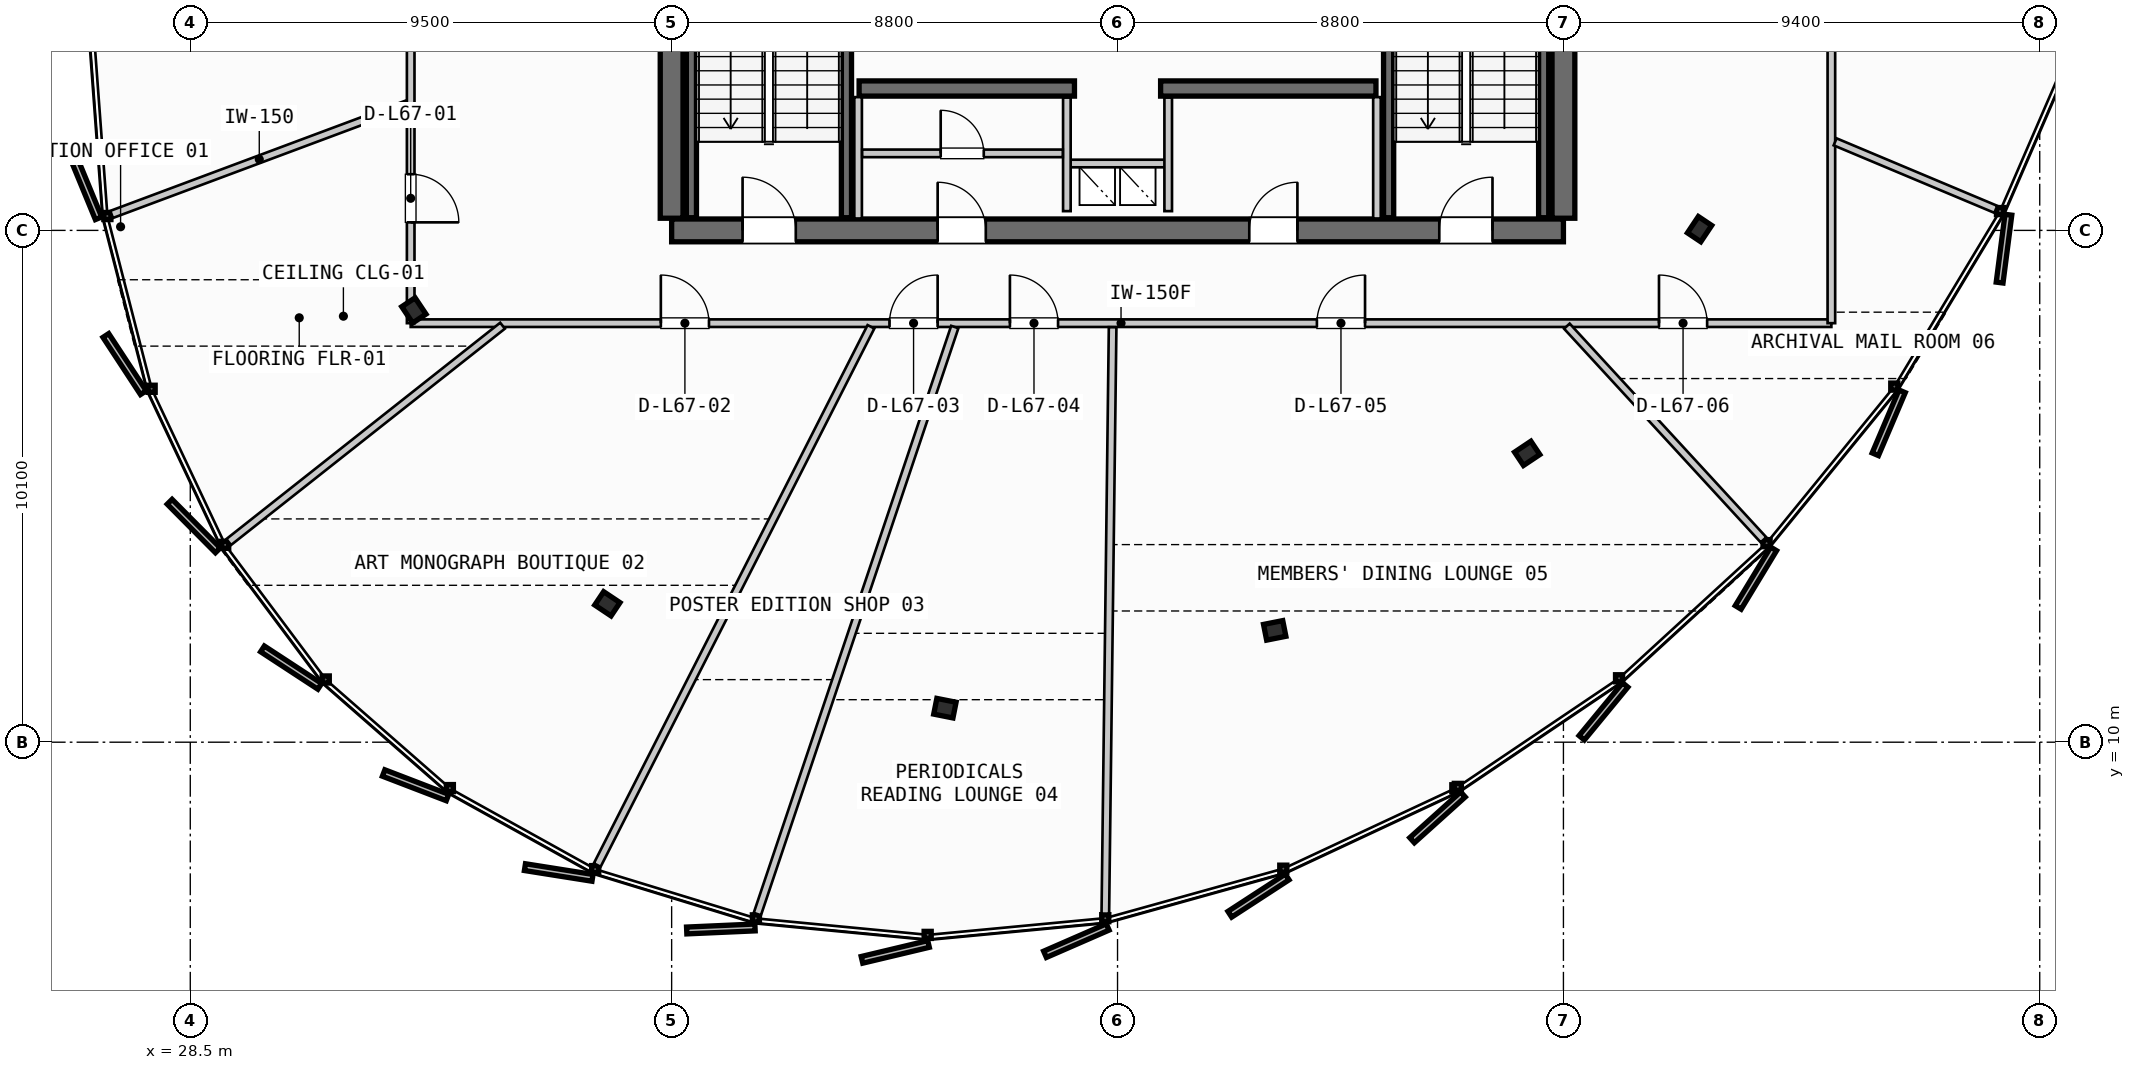
"""IFC4 building model, lengths in metres.
Left out: names, types, materials, properties, quantities, classifications, styles, units other than length and angle.
Written with IfcOpenShell. Run it as: python <this file> out.ifc"""

import sys

from ifc_helpers import new_model, si_unit, direction, frame, frame_2d, origin, origin_2d, place, context, subcontext, project, spatial, rectangle, i_section, extrude, source, transform, mapped, element, fill, save


model = new_model("IFC4")
c1 = context("Model", 3, precision=1e-05, world=origin(), true_north=direction((0.0, 1.0)))
c2 = subcontext(c1, "Body", "Model", "MODEL_VIEW")
j1 = project(units=[si_unit("LENGTHUNIT", "METRE"), si_unit("PLANEANGLEUNIT", "RADIAN")], contexts=[c1])
p1 = place(None, origin())
s1 = spatial("IfcSite", under=j1, at=p1, CompositionType="ELEMENT")
p2 = place(p1, origin())
s2 = spatial("IfcBuilding", under=s1, at=p2, CompositionType="ELEMENT")
p3 = place(p2, frame((0.0, 0.0, 256.0)))
s3 = spatial("IfcBuildingStorey", under=s2, at=p3, CompositionType="ELEMENT", Elevation=256.0)
p4 = place(p3, frame((38.0, 20.1, 0.0), z_axis=(0.0, 0.0, 1.0), x_axis=(1.0, 0.0, 0.0)))
e1 = element("IfcWall", 1, at=p4, inside=s3, PredefinedType="SHEAR", context=c2, shape_type="SweptSolid", body=[
    extrude(rectangle(XDim=17.6, YDim=0.45, at=frame_2d((8.8, 0.0))), origin(), (0.0, 0.0, 1.0), 3.21),
])
p5 = place(p4, frame((1.4, 0.0, 0.0)))
e2 = element("IfcOpeningElement", 2, at=p5, cuts=e1, PredefinedType="OPENING", context=c2, shape_type="SweptSolid", body=[
    extrude(rectangle(XDim=1.05, YDim=2.15, at=frame_2d((0.525, 1.075))), frame((0.0, 0.235, 0.0), z_axis=(0.0, -1.0, 0.0), x_axis=(1.0, 0.0, 0.0)), (0.0, 0.0, 1.0), 0.47),
])
p6 = place(p4, frame((15.15, 0.0, 0.0)))
e3 = element("IfcOpeningElement", 3, at=p6, cuts=e1, PredefinedType="OPENING", context=c2, shape_type="SweptSolid", body=[
    extrude(rectangle(XDim=1.05, YDim=2.15, at=frame_2d((0.525, 1.075))), frame((0.0, 0.235, 0.0), z_axis=(0.0, -1.0, 0.0), x_axis=(1.0, 0.0, 0.0)), (0.0, 0.0, 1.0), 0.47),
])
p7 = place(p4, frame((5.25, 0.0, 0.0)))
e4 = element("IfcOpeningElement", 4, at=p7, cuts=e1, PredefinedType="OPENING", context=c2, shape_type="SweptSolid", body=[
    extrude(rectangle(XDim=0.95, YDim=2.15, at=frame_2d((0.475, 1.075))), frame((0.0, 0.235, 0.0), z_axis=(0.0, -1.0, 0.0), x_axis=(1.0, 0.0, 0.0)), (0.0, 0.0, 1.0), 0.47),
])
p8 = place(p4, frame((11.4, 0.0, 0.0)))
e5 = element("IfcOpeningElement", 5, at=p8, cuts=e1, PredefinedType="OPENING", context=c2, shape_type="SweptSolid", body=[
    extrude(rectangle(XDim=0.95, YDim=2.15, at=frame_2d((0.475, 1.075))), frame((0.0, 0.235, 0.0), z_axis=(0.0, -1.0, 0.0), x_axis=(1.0, 0.0, 0.0)), (0.0, 0.0, 1.0), 0.47),
])
p9 = place(p3, frame((38.0, 35.26, 0.0), z_axis=(0.0, 0.0, 1.0), x_axis=(0.0, -1.0, 0.0)))
e6 = element("IfcWall", 6, at=p9, inside=s3, PredefinedType="SHEAR", context=c2, shape_type="SweptSolid", body=[
    extrude(rectangle(XDim=14.92, YDim=0.45, at=frame_2d((7.46, 0.0))), origin(), (0.0, 0.0, 1.0), 3.21),
])
p10 = place(p9, frame((5.21, 0.0, 0.0)))
e7 = element("IfcOpeningElement", 7, at=p10, cuts=e6, PredefinedType="OPENING", context=c2, shape_type="SweptSolid", body=[
    extrude(rectangle(XDim=1.1, YDim=2.2, at=frame_2d((0.55, 1.1))), frame((0.0, 0.235, 0.0), z_axis=(0.0, -1.0, 0.0), x_axis=(1.0, 0.0, 0.0)), (0.0, 0.0, 1.0), 0.47),
])
p11 = place(p3, frame((55.6, 20.34, 0.0), z_axis=(0.0, 0.0, 1.0), x_axis=(0.0, 1.0, 0.0)))
e8 = element("IfcWall", 8, at=p11, inside=s3, PredefinedType="SHEAR", context=c2, shape_type="SweptSolid", body=[
    extrude(rectangle(XDim=14.92, YDim=0.45, at=frame_2d((7.46, 0.0))), origin(), (0.0, 0.0, 1.0), 3.21),
])
p12 = place(p11, frame((12.71, 0.0, 0.0)))
e9 = element("IfcOpeningElement", 9, at=p12, cuts=e8, PredefinedType="OPENING", context=c2, shape_type="SweptSolid", body=[
    extrude(rectangle(XDim=1.05, YDim=2.15, at=frame_2d((0.525, 1.075))), frame((0.0, 0.235, 0.0), z_axis=(0.0, -1.0, 0.0), x_axis=(1.0, 0.0, 0.0)), (0.0, 0.0, 1.0), 0.47),
])
p13 = place(p11, frame((8.61, 0.0, 0.0)))
e10 = element("IfcOpeningElement", 10, at=p13, cuts=e8, PredefinedType="OPENING", context=c2, shape_type="SweptSolid", body=[
    extrude(rectangle(XDim=1.1, YDim=2.2, at=frame_2d((0.55, 1.1))), frame((0.0, 0.235, 0.0), z_axis=(0.0, -1.0, 0.0), x_axis=(1.0, 0.0, 0.0)), (0.0, 0.0, 1.0), 0.47),
])
for number, where, z_axis, x_axis in (
    (11, (41.7, 22.9, 0.0), (0.0, 0.0, 1.0), (1.0, 0.0, 0.0)),
    (12, (47.65, 22.9, 0.0), (0.0, 0.0, 1.0), (1.0, 0.0, 0.0)),
):
    element("IfcWall", number, at=place(p3, frame(where, z_axis=z_axis, x_axis=x_axis)), inside=s3, PredefinedType="SHEAR", context=c2, shape_type="SweptSolid", body=[
        extrude(rectangle(XDim=4.25, YDim=0.3, at=frame_2d((2.125, 0.0))), origin(), (0.0, 0.0, 1.0), 3.21),
    ])
m1 = source(origin(), c2, "Body", "SweptSolid", [
    extrude(i_section(OverallWidth=0.387, OverallDepth=0.316, WebThickness=0.019, FlangeThickness=0.028, FilletRadius=0.015, at=origin_2d()), origin(), (0.0, 0.0, 1.0), 3.21),
])
for number, where, z_axis, x_axis in (
    (13, (32.913, 18.521, 0.0), (0.0, 0.0, 1.0), (-0.831, -0.556, 0.0)),
    (14, (36.731, 12.731, 0.0), (0.0, 0.0, 1.0), (-0.556, -0.831, 0.0)),
    (15, (43.393, 10.671, 0.0), (0.0, 0.0, 1.0), (-0.195, -0.981, 0.0)),
    (16, (49.902, 12.207, 0.0), (0.0, 0.0, 1.0), (0.195, -0.981, 0.0)),
    (17, (54.885, 15.7, 0.0), (0.0, 0.0, 1.0), (0.556, -0.831, 0.0)),
    (18, (58.287, 20.125, 0.0), (0.0, 0.0, 1.0), (0.831, -0.556, 0.0)),
):
    element("IfcColumn", number, at=place(p3, frame(where, z_axis=z_axis, x_axis=x_axis)), inside=s3, PredefinedType="COLUMN", context=c2, shape_type="MappedRepresentation", body=[
        mapped(m1, transform((0.0, 0.0, 0.0), scale=1.0)),
    ])
for number, where, z_axis, x_axis in (
    (19, (41.45, 27.7, 0.0), (0.0, 0.0, 1.0), (0.0, -1.0, 0.0)),
    (20, (38.39, 20.35, 0.0), (0.0, 0.0, 1.0), (0.0, 1.0, 0.0)),
    (21, (55.21, 27.7, 0.0), (0.0, 0.0, 1.0), (0.0, -1.0, 0.0)),
    (22, (52.15, 20.35, 0.0), (0.0, 0.0, 1.0), (0.0, 1.0, 0.0)),
):
    element("IfcWall", number, at=place(p3, frame(where, z_axis=z_axis, x_axis=x_axis)), inside=s3, PredefinedType="SHEAR", context=c2, shape_type="SweptSolid", body=[
        extrude(rectangle(XDim=7.35, YDim=0.2, at=frame_2d((3.675, 0.0))), origin(), (0.0, 0.0, 1.0), 3.21),
    ])
p14 = place(p3, frame((45.8, 21.42, 0.0), z_axis=(0.0, 0.0, 1.0), x_axis=(1.0, 0.0, 0.0)))
e23 = element("IfcWall", 23, at=p14, inside=s3, PredefinedType="PARTITIONING", context=c2, shape_type="SweptSolid", body=[
    extrude(rectangle(XDim=2.0, YDim=0.15, at=frame_2d((1.0, 0.0))), origin(), (0.0, 0.0, 1.0), 2.28),
])
for number, where, z_axis, x_axis in (
    (24, (45.8, 20.48, 0.0), (0.0, 0.0, 1.0), (0.0, 1.0, 0.0)),
    (25, (47.8, 20.48, 0.0), (0.0, 0.0, 1.0), (0.0, 1.0, 0.0)),
):
    element("IfcWall", number, at=place(p3, frame(where, z_axis=z_axis, x_axis=x_axis)), inside=s3, PredefinedType="PARTITIONING", context=c2, shape_type="SweptSolid", body=[
        extrude(rectangle(XDim=2.24, YDim=0.15, at=frame_2d((1.12, 0.0))), origin(), (0.0, 0.0, 1.0), 2.28),
    ])
for number, where, z_axis, x_axis in (
    (26, (41.68, 20.335, 0.0), (0.0, 0.0, 1.0), (0.0, 1.0, 0.0)),
    (27, (51.92, 20.335, 0.0), (0.0, 0.0, 1.0), (0.0, 1.0, 0.0)),
):
    element("IfcWall", number, at=place(p3, frame(where, z_axis=z_axis, x_axis=x_axis)), inside=s3, PredefinedType="PARTITIONING", context=c2, shape_type="SweptSolid", body=[
        extrude(rectangle(XDim=2.395, YDim=0.15, at=frame_2d((1.198, 0.0))), origin(), (0.0, 0.0, 1.0), 2.28),
    ])
p15 = place(p3, frame((41.76, 21.62, 0.0), z_axis=(0.0, 0.0, 1.0), x_axis=(1.0, 0.0, 0.0)))
e28 = element("IfcWall", 28, at=p15, inside=s3, PredefinedType="PARTITIONING", context=c2, shape_type="SweptSolid", body=[
    extrude(rectangle(XDim=3.96, YDim=0.15, at=frame_2d((1.98, 0.0))), origin(), (0.0, 0.0, 1.0), 2.28),
])
p16 = place(p15, frame((1.55, 0.0, 0.0)))
e29 = element("IfcOpeningElement", 29, at=p16, cuts=e28, PredefinedType="OPENING", context=c2, shape_type="SweptSolid", body=[
    extrude(rectangle(XDim=0.85, YDim=2.15, at=frame_2d((0.425, 1.075))), frame((0.0, 0.085, 0.0), z_axis=(0.0, -1.0, 0.0), x_axis=(1.0, 0.0, 0.0)), (0.0, 0.0, 1.0), 0.17),
])
p17 = place(p3, frame((32.85, 18.269, 0.0), z_axis=(0.0, 0.0, 1.0), x_axis=(1.0, 0.0, 0.0)))
e30 = element("IfcWall", 30, at=p17, inside=s3, PredefinedType="PARTITIONING", context=c2, shape_type="SweptSolid", body=[
    extrude(rectangle(XDim=28.038, YDim=0.15, at=frame_2d((14.019, 0.0))), origin(), (0.0, 0.0, 1.0), 2.28),
])
p18 = place(p17, frame((4.937, 0.0, 0.0)))
e31 = element("IfcOpeningElement", 31, at=p18, cuts=e30, PredefinedType="OPENING", context=c2, shape_type="SweptSolid", body=[
    extrude(rectangle(XDim=0.95, YDim=2.15, at=frame_2d((0.475, 1.075))), frame((0.0, 0.085, 0.0), z_axis=(0.0, -1.0, 0.0), x_axis=(1.0, 0.0, 0.0)), (0.0, 0.0, 1.0), 0.17),
])
p19 = place(p17, frame((9.45, 0.0, 0.0)))
e32 = element("IfcOpeningElement", 32, at=p19, cuts=e30, PredefinedType="OPENING", context=c2, shape_type="SweptSolid", body=[
    extrude(rectangle(XDim=0.95, YDim=2.15, at=frame_2d((0.475, 1.075))), frame((0.0, 0.085, 0.0), z_axis=(0.0, -1.0, 0.0), x_axis=(1.0, 0.0, 0.0)), (0.0, 0.0, 1.0), 0.17),
])
p20 = place(p17, frame((11.826, 0.0, 0.0)))
e33 = element("IfcOpeningElement", 33, at=p20, cuts=e30, PredefinedType="OPENING", context=c2, shape_type="SweptSolid", body=[
    extrude(rectangle(XDim=0.95, YDim=2.15, at=frame_2d((0.475, 1.075))), frame((0.0, 0.085, 0.0), z_axis=(0.0, -1.0, 0.0), x_axis=(1.0, 0.0, 0.0)), (0.0, 0.0, 1.0), 0.17),
])
p21 = place(p17, frame((17.885, 0.0, 0.0)))
e34 = element("IfcOpeningElement", 34, at=p21, cuts=e30, PredefinedType="OPENING", context=c2, shape_type="SweptSolid", body=[
    extrude(rectangle(XDim=0.95, YDim=2.15, at=frame_2d((0.475, 1.075))), frame((0.0, 0.085, 0.0), z_axis=(0.0, -1.0, 0.0), x_axis=(1.0, 0.0, 0.0)), (0.0, 0.0, 1.0), 0.17),
])
p22 = place(p17, frame((24.636, 0.0, 0.0)))
e35 = element("IfcOpeningElement", 35, at=p22, cuts=e30, PredefinedType="OPENING", context=c2, shape_type="SweptSolid", body=[
    extrude(rectangle(XDim=0.95, YDim=2.15, at=frame_2d((0.475, 1.075))), frame((0.0, 0.085, 0.0), z_axis=(0.0, -1.0, 0.0), x_axis=(1.0, 0.0, 0.0)), (0.0, 0.0, 1.0), 0.17),
])
p23 = place(p3, frame((60.888, 18.269, 0.0), z_axis=(0.0, 0.0, 1.0), x_axis=(0.0, 1.0, 0.0)))
e36 = element("IfcWall", 36, at=p23, inside=s3, PredefinedType="PARTITIONING", context=c2, shape_type="SweptSolid", body=[
    extrude(rectangle(XDim=19.293, YDim=0.15, at=frame_2d((9.646, 0.0))), origin(), (0.0, 0.0, 1.0), 2.28),
])
p24 = place(p23, frame((9.164, 0.0, 0.0)))
e37 = element("IfcOpeningElement", 37, at=p24, cuts=e36, PredefinedType="OPENING", context=c2, shape_type="SweptSolid", body=[
    extrude(rectangle(XDim=0.95, YDim=2.15, at=frame_2d((0.475, 1.075))), frame((0.0, 0.085, 0.0), z_axis=(0.0, -1.0, 0.0), x_axis=(1.0, 0.0, 0.0)), (0.0, 0.0, 1.0), 0.17),
])
p25 = place(p23, frame((16.715, 0.0, 0.0)))
e38 = element("IfcOpeningElement", 38, at=p25, cuts=e36, PredefinedType="OPENING", context=c2, shape_type="SweptSolid", body=[
    extrude(rectangle(XDim=0.95, YDim=2.15, at=frame_2d((0.475, 1.075))), frame((0.0, 0.085, 0.0), z_axis=(0.0, -1.0, 0.0), x_axis=(1.0, 0.0, 0.0)), (0.0, 0.0, 1.0), 0.17),
])
p26 = place(p3, frame((32.85, 37.562, 0.0), z_axis=(0.0, 0.0, 1.0), x_axis=(0.0, -1.0, 0.0)))
e39 = element("IfcWall", 39, at=p26, inside=s3, PredefinedType="PARTITIONING", context=c2, shape_type="SweptSolid", body=[
    extrude(rectangle(XDim=19.293, YDim=0.15, at=frame_2d((9.646, 0.0))), origin(), (0.0, 0.0, 1.0), 2.28),
])
p27 = place(p26, frame((16.354, 0.0, 0.0)))
e40 = element("IfcOpeningElement", 40, at=p27, cuts=e39, PredefinedType="OPENING", context=c2, shape_type="SweptSolid", body=[
    extrude(rectangle(XDim=0.95, YDim=2.15, at=frame_2d((0.475, 1.075))), frame((0.0, 0.085, 0.0), z_axis=(0.0, -1.0, 0.0), x_axis=(1.0, 0.0, 0.0)), (0.0, 0.0, 1.0), 0.17),
])
p28 = place(p26, frame((8.92, 0.0, 0.0)))
e41 = element("IfcOpeningElement", 41, at=p28, cuts=e39, PredefinedType="OPENING", context=c2, shape_type="SweptSolid", body=[
    extrude(rectangle(XDim=0.95, YDim=2.15, at=frame_2d((0.475, 1.075))), frame((0.0, 0.085, 0.0), z_axis=(0.0, -1.0, 0.0), x_axis=(1.0, 0.0, 0.0)), (0.0, 0.0, 1.0), 0.17),
])
p29 = place(p3, frame((32.775, 22.59, 0.0), z_axis=(0.0, 0.0, 1.0), x_axis=(-0.936863634519, -0.349694910337, 0.0)))
e42 = element("IfcWall", 42, at=p29, inside=s3, PredefinedType="PARTITIONING", context=c2, shape_type="SweptSolid", body=[
    extrude(rectangle(XDim=6.22, YDim=0.15, at=frame_2d((3.11, 0.0))), origin(), (0.0, 0.0, 1.0), 2.28),
])
p30 = place(p3, frame((34.663, 18.219, 0.0), z_axis=(0.0, 0.0, 1.0), x_axis=(-0.784696697403, -0.619879902146, 0.0)))
e43 = element("IfcWall", 43, at=p30, inside=s3, PredefinedType="PARTITIONING", context=c2, shape_type="SweptSolid", body=[
    extrude(rectangle(XDim=6.886, YDim=0.15, at=frame_2d((3.443, 0.0))), origin(), (0.0, 0.0, 1.0), 2.28),
])
p31 = place(p3, frame((41.934, 18.198, 0.0), z_axis=(0.0, 0.0, 1.0), x_axis=(-0.453308200727, -0.891353843966, 0.0)))
e44 = element("IfcWall", 44, at=p31, inside=s3, PredefinedType="PARTITIONING", context=c2, shape_type="SweptSolid", body=[
    extrude(rectangle(XDim=11.917, YDim=0.15, at=frame_2d((5.958, 0.0))), origin(), (0.0, 0.0, 1.0), 2.28),
])
p32 = place(p3, frame((43.588, 18.193, 0.0), z_axis=(0.0, 0.0, 1.0), x_axis=(-0.318803393857, -0.947820867076, 0.0)))
e45 = element("IfcWall", 45, at=p32, inside=s3, PredefinedType="PARTITIONING", context=c2, shape_type="SweptSolid", body=[
    extrude(rectangle(XDim=12.222, YDim=0.15, at=frame_2d((6.111, 0.0))), origin(), (0.0, 0.0, 1.0), 2.28),
])
p33 = place(p3, frame((46.703, 18.189, 0.0), z_axis=(0.0, 0.0, 1.0), x_axis=(-0.01242546319, -0.999922800952, 0.0)))
e46 = element("IfcWall", 46, at=p33, inside=s3, PredefinedType="PARTITIONING", context=c2, shape_type="SweptSolid", body=[
    extrude(rectangle(XDim=11.573, YDim=0.15, at=frame_2d((5.787, 0.0))), origin(), (0.0, 0.0, 1.0), 2.28),
])
p34 = place(p3, frame((55.668, 18.21, 0.0), z_axis=(0.0, 0.0, 1.0), x_axis=(0.677205136049, -0.735794267243, 0.0)))
e47 = element("IfcWall", 47, at=p34, inside=s3, PredefinedType="PARTITIONING", context=c2, shape_type="SweptSolid", body=[
    extrude(rectangle(XDim=5.73, YDim=0.15, at=frame_2d((2.865, 0.0))), origin(), (0.0, 0.0, 1.0), 2.28),
])
p35 = place(p3, frame((60.962, 21.848, 0.0), z_axis=(0.0, 0.0, 1.0), x_axis=(0.921987679929, -0.387219211892, 0.0)))
e48 = element("IfcWall", 48, at=p35, inside=s3, PredefinedType="PARTITIONING", context=c2, shape_type="SweptSolid", body=[
    extrude(rectangle(XDim=3.44, YDim=0.15, at=frame_2d((1.72, 0.0))), origin(), (0.0, 0.0, 1.0), 2.28),
])
m2 = source(origin(), c2, "Body", "SweptSolid", [
    extrude(rectangle(XDim=1.05, YDim=2.15, at=frame_2d((0.525, 1.075))), frame((0.0, 0.025, 0.0), z_axis=(0.0, -1.0, 0.0), x_axis=(1.0, 0.0, 0.0)), (0.0, 0.0, 1.0), 0.05),
])
p36 = place(p5, origin())
e49 = element("IfcDoor", 49, at=p36, inside=s3, OperationType="SINGLE_SWING_LEFT", PredefinedType="DOOR", context=c2, shape_type="MappedRepresentation", body=[
    mapped(m2, transform((0.0, 0.0, 0.0), scale=1.0)),
])
fill(e2, e49)
p37 = place(p6, origin())
e50 = element("IfcDoor", 50, at=p37, inside=s3, OperationType="SINGLE_SWING_RIGHT", PredefinedType="DOOR", context=c2, shape_type="MappedRepresentation", body=[
    mapped(m2, transform((0.0, 0.0, 0.0), scale=1.0)),
])
fill(e3, e50)
m3 = source(origin(), c2, "Body", "SweptSolid", [
    extrude(rectangle(XDim=0.95, YDim=2.15, at=frame_2d((0.475, 1.075))), frame((0.0, 0.025, 0.0), z_axis=(0.0, -1.0, 0.0), x_axis=(1.0, 0.0, 0.0)), (0.0, 0.0, 1.0), 0.05),
])
p38 = place(p7, origin())
e51 = element("IfcDoor", 51, at=p38, inside=s3, OperationType="SINGLE_SWING_LEFT", PredefinedType="DOOR", context=c2, shape_type="MappedRepresentation", body=[
    mapped(m3, transform((0.0, 0.0, 0.0), scale=1.0)),
])
fill(e4, e51)
p39 = place(p8, origin())
e52 = element("IfcDoor", 52, at=p39, inside=s3, OperationType="SINGLE_SWING_RIGHT", PredefinedType="DOOR", context=c2, shape_type="MappedRepresentation", body=[
    mapped(m3, transform((0.0, 0.0, 0.0), scale=1.0)),
])
fill(e5, e52)
m4 = source(origin(), c2, "Body", "SweptSolid", [
    extrude(rectangle(XDim=0.85, YDim=2.15, at=frame_2d((0.425, 1.075))), frame((0.0, 0.025, 0.0), z_axis=(0.0, -1.0, 0.0), x_axis=(1.0, 0.0, 0.0)), (0.0, 0.0, 1.0), 0.05),
])
p40 = place(p16, origin())
e53 = element("IfcDoor", 53, at=p40, inside=s3, OperationType="SINGLE_SWING_LEFT", PredefinedType="DOOR", context=c2, shape_type="MappedRepresentation", body=[
    mapped(m4, transform((0.0, 0.0, 0.0), scale=1.0)),
])
fill(e29, e53)
p41 = place(p18, origin())
e54 = element("IfcDoor", 54, at=p41, inside=s3, OperationType="SINGLE_SWING_LEFT", PredefinedType="DOOR", context=c2, shape_type="MappedRepresentation", body=[
    mapped(m3, transform((0.0, 0.0, 0.0), scale=1.0)),
])
fill(e31, e54)
p42 = place(p19, origin())
e55 = element("IfcDoor", 55, at=p42, inside=s3, OperationType="SINGLE_SWING_RIGHT", PredefinedType="DOOR", context=c2, shape_type="MappedRepresentation", body=[
    mapped(m3, transform((0.0, 0.0, 0.0), scale=1.0)),
])
fill(e32, e55)
p43 = place(p20, origin())
e56 = element("IfcDoor", 56, at=p43, inside=s3, OperationType="SINGLE_SWING_LEFT", PredefinedType="DOOR", context=c2, shape_type="MappedRepresentation", body=[
    mapped(m3, transform((0.0, 0.0, 0.0), scale=1.0)),
])
fill(e33, e56)
p44 = place(p21, origin())
e57 = element("IfcDoor", 57, at=p44, inside=s3, OperationType="SINGLE_SWING_RIGHT", PredefinedType="DOOR", context=c2, shape_type="MappedRepresentation", body=[
    mapped(m3, transform((0.0, 0.0, 0.0), scale=1.0)),
])
fill(e34, e57)
p45 = place(p22, origin())
e58 = element("IfcDoor", 58, at=p45, inside=s3, OperationType="SINGLE_SWING_LEFT", PredefinedType="DOOR", context=c2, shape_type="MappedRepresentation", body=[
    mapped(m3, transform((0.0, 0.0, 0.0), scale=1.0)),
])
fill(e35, e58)
p46 = place(p27, origin())
e59 = element("IfcDoor", 59, at=p46, inside=s3, OperationType="SINGLE_SWING_RIGHT", PredefinedType="DOOR", context=c2, shape_type="MappedRepresentation", body=[
    mapped(m3, transform((0.0, 0.0, 0.0), scale=1.0)),
])
fill(e40, e59)
save(model, sys.argv[1])
